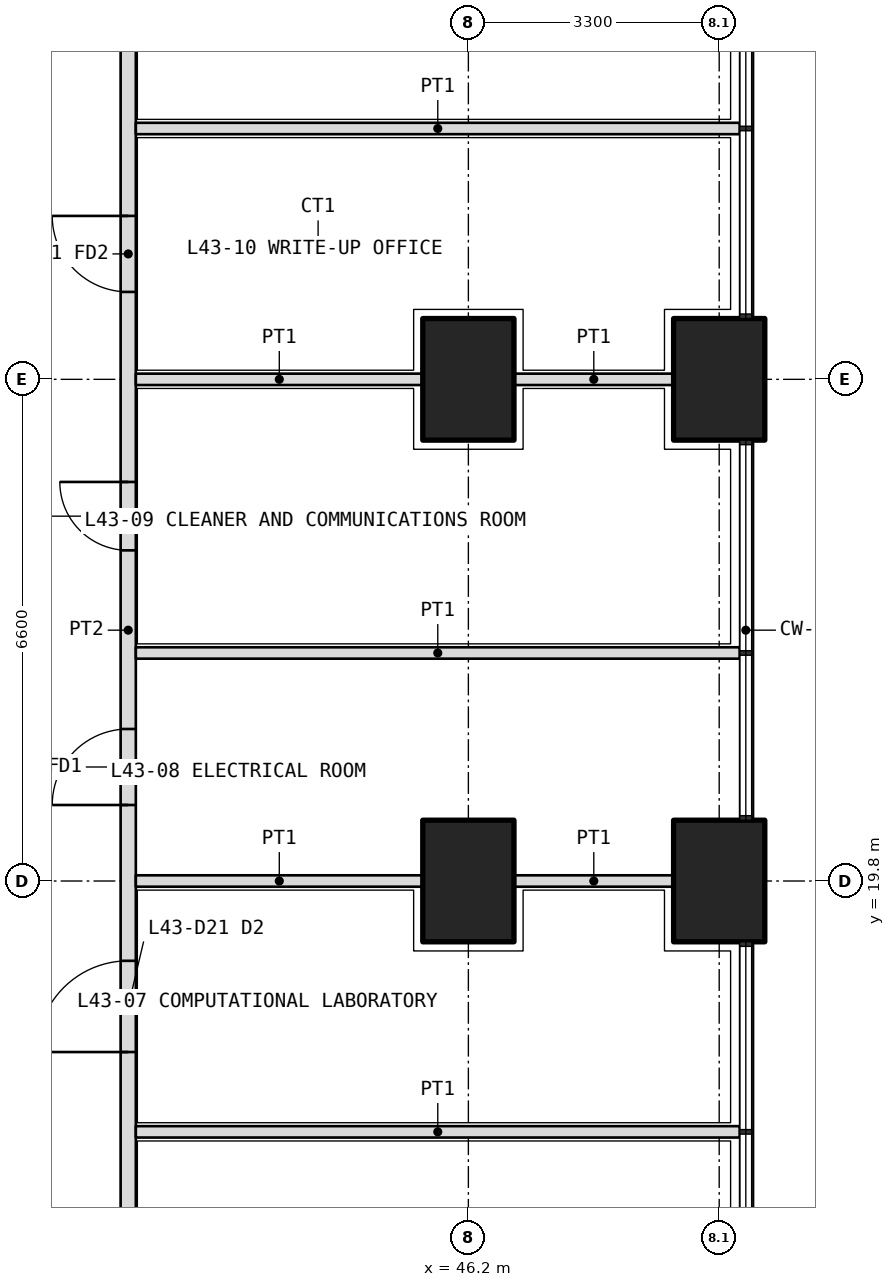
"""IFC4 building model, lengths in metres.
Left out: names, types, materials, properties, quantities, classifications, styles, units other than length and angle.
Written with IfcOpenShell. Run it as: python <this file> out.ifc"""

import sys

from ifc_helpers import new_model, si_unit, direction, frame, frame_2d, origin, origin_2d, place, context, subcontext, project, spatial, rectangle, extrude, element, fill, save


model = new_model("IFC4")
c1 = context("Model", 3, precision=1e-05, world=origin(), true_north=direction((0.0, 1.0)))
c2 = subcontext(c1, "Body", "Model", "MODEL_VIEW")
j1 = project(units=[si_unit("LENGTHUNIT", "METRE"), si_unit("PLANEANGLEUNIT", "RADIAN")], contexts=[c1])
p1 = place(None, origin())
s1 = spatial("IfcSite", under=j1, at=p1, CompositionType="ELEMENT")
p2 = place(p1, origin())
s2 = spatial("IfcBuilding", under=s1, at=p2, CompositionType="ELEMENT")
p3 = place(p2, frame((0.0, 0.0, 189.3)))
s3 = spatial("IfcBuildingStorey", under=s2, at=p3, CompositionType="ELEMENT", Elevation=189.3)
for number, where, z_axis, x_axis in (
    (1, (49.5, 19.8, 0.0), (0.0, 0.0, 1.0), (0.0, 1.0, 0.0)),
    (2, (49.5, 26.4, 0.0), (0.0, 0.0, 1.0), (0.0, 1.0, 0.0)),
    (3, (46.2, 19.8, 0.0), (0.0, 0.0, 1.0), (0.0, 1.0, 0.0)),
    (4, (46.2, 26.4, 0.0), (0.0, 0.0, 1.0), (0.0, 1.0, 0.0)),
):
    element("IfcColumn", number, at=place(p3, frame(where, z_axis=z_axis, x_axis=x_axis)), inside=s3, PredefinedType="COLUMN", context=c2, shape_type="SweptSolid", body=[
        extrude(rectangle(XDim=1.6, YDim=1.2, at=origin_2d()), origin(), (0.0, 0.0, 1.0), 4.2),
    ])
p4 = place(p3, frame((41.725, 11.175, 0.0), z_axis=(0.0, 0.0, 1.0), x_axis=(0.0, 1.0, 0.0)))
e5 = element("IfcWall", 5, at=p4, inside=s3, PredefinedType="PARTITIONING", context=c2, shape_type="SweptSolid", body=[
    extrude(rectangle(XDim=23.85, YDim=0.2, at=frame_2d((11.925, 0.0))), origin(), (0.0, 0.0, 1.0), 2.85),
])
p5 = place(p4, frame((2.012, 0.0, 0.0)))
e6 = element("IfcOpeningElement", 6, at=p5, cuts=e5, PredefinedType="OPENING", context=c2, shape_type="SweptSolid", body=[
    extrude(rectangle(XDim=1.2, YDim=2.1, at=frame_2d((0.6, 1.05))), frame((0.0, 0.11, 0.0), z_axis=(0.0, -1.0, 0.0), x_axis=(1.0, 0.0, 0.0)), (0.0, 0.0, 1.0), 0.22),
])
p6 = place(p4, frame((6.375, 0.0, 0.0)))
e7 = element("IfcOpeningElement", 7, at=p6, cuts=e5, PredefinedType="OPENING", context=c2, shape_type="SweptSolid", body=[
    extrude(rectangle(XDim=1.2, YDim=2.1, at=frame_2d((0.6, 1.05))), frame((0.0, 0.11, 0.0), z_axis=(0.0, -1.0, 0.0), x_axis=(1.0, 0.0, 0.0)), (0.0, 0.0, 1.0), 0.22),
])
p7 = place(p4, frame((9.625, 0.0, 0.0)))
e8 = element("IfcOpeningElement", 8, at=p7, cuts=e5, PredefinedType="OPENING", context=c2, shape_type="SweptSolid", body=[
    extrude(rectangle(XDim=1.0, YDim=2.1, at=frame_2d((0.5, 1.05))), frame((0.0, 0.11, 0.0), z_axis=(0.0, -1.0, 0.0), x_axis=(1.0, 0.0, 0.0)), (0.0, 0.0, 1.0), 0.22),
])
p8 = place(p4, frame((12.975, 0.0, 0.0)))
e9 = element("IfcOpeningElement", 9, at=p8, cuts=e5, PredefinedType="OPENING", context=c2, shape_type="SweptSolid", body=[
    extrude(rectangle(XDim=0.9, YDim=2.1, at=frame_2d((0.45, 1.05))), frame((0.0, 0.11, 0.0), z_axis=(0.0, -1.0, 0.0), x_axis=(1.0, 0.0, 0.0)), (0.0, 0.0, 1.0), 0.22),
])
p9 = place(p4, frame((16.375, 0.0, 0.0)))
e10 = element("IfcOpeningElement", 10, at=p9, cuts=e5, PredefinedType="OPENING", context=c2, shape_type="SweptSolid", body=[
    extrude(rectangle(XDim=1.0, YDim=2.1, at=frame_2d((0.5, 1.05))), frame((0.0, 0.11, 0.0), z_axis=(0.0, -1.0, 0.0), x_axis=(1.0, 0.0, 0.0)), (0.0, 0.0, 1.0), 0.22),
])
p10 = place(p4, frame((20.637, 0.0, 0.0)))
e11 = element("IfcOpeningElement", 11, at=p10, cuts=e5, PredefinedType="OPENING", context=c2, shape_type="SweptSolid", body=[
    extrude(rectangle(XDim=1.2, YDim=2.1, at=frame_2d((0.6, 1.05))), frame((0.0, 0.11, 0.0), z_axis=(0.0, -1.0, 0.0), x_axis=(1.0, 0.0, 0.0)), (0.0, 0.0, 1.0), 0.22),
])
p11 = place(p3, frame((49.77, 22.8, 0.0), z_axis=(0.0, 0.0, 1.0), x_axis=(-1.0, 0.0, 0.0)))
e12 = element("IfcWall", 12, at=p11, inside=s3, PredefinedType="PARTITIONING", context=c2, shape_type="SweptSolid", body=[
    extrude(rectangle(XDim=7.945, YDim=0.15, at=frame_2d((3.973, 0.0))), origin(), (0.0, 0.0, 1.0), 2.7),
])
p12 = place(p3, frame((48.9, 26.4, 0.0), z_axis=(0.0, 0.0, 1.0), x_axis=(-1.0, 0.0, 0.0)))
e13 = element("IfcWall", 13, at=p12, inside=s3, PredefinedType="PARTITIONING", context=c2, shape_type="SweptSolid", body=[
    extrude(rectangle(XDim=2.1, YDim=0.15, at=frame_2d((1.05, 0.0))), origin(), (0.0, 0.0, 1.0), 2.85),
])
p13 = place(p3, frame((45.6, 26.4, 0.0), z_axis=(0.0, 0.0, 1.0), x_axis=(-1.0, 0.0, 0.0)))
e14 = element("IfcWall", 14, at=p13, inside=s3, PredefinedType="PARTITIONING", context=c2, shape_type="SweptSolid", body=[
    extrude(rectangle(XDim=3.775, YDim=0.15, at=frame_2d((1.888, 0.0))), origin(), (0.0, 0.0, 1.0), 2.85),
])
p14 = place(p3, frame((49.77, 16.5, 0.0), z_axis=(0.0, 0.0, 1.0), x_axis=(-1.0, 0.0, 0.0)))
e15 = element("IfcWall", 15, at=p14, inside=s3, PredefinedType="PARTITIONING", context=c2, shape_type="SweptSolid", body=[
    extrude(rectangle(XDim=7.945, YDim=0.15, at=frame_2d((3.973, 0.0))), origin(), (0.0, 0.0, 1.0), 2.7),
])
p15 = place(p3, frame((48.9, 19.8, 0.0), z_axis=(0.0, 0.0, 1.0), x_axis=(-1.0, 0.0, 0.0)))
e16 = element("IfcWall", 16, at=p15, inside=s3, PredefinedType="PARTITIONING", context=c2, shape_type="SweptSolid", body=[
    extrude(rectangle(XDim=2.1, YDim=0.15, at=frame_2d((1.05, 0.0))), origin(), (0.0, 0.0, 1.0), 2.85),
])
p16 = place(p3, frame((45.6, 19.8, 0.0), z_axis=(0.0, 0.0, 1.0), x_axis=(-1.0, 0.0, 0.0)))
e17 = element("IfcWall", 17, at=p16, inside=s3, PredefinedType="PARTITIONING", context=c2, shape_type="SweptSolid", body=[
    extrude(rectangle(XDim=3.775, YDim=0.15, at=frame_2d((1.888, 0.0))), origin(), (0.0, 0.0, 1.0), 2.85),
])
p17 = place(p3, frame((49.77, 29.7, 0.0), z_axis=(0.0, 0.0, 1.0), x_axis=(-1.0, 0.0, 0.0)))
e18 = element("IfcWall", 18, at=p17, inside=s3, PredefinedType="PARTITIONING", context=c2, shape_type="SweptSolid", body=[
    extrude(rectangle(XDim=7.945, YDim=0.15, at=frame_2d((3.973, 0.0))), origin(), (0.0, 0.0, 1.0), 2.7),
])
p18 = place(p6, origin())
e19 = element("IfcDoor", 19, at=p18, inside=s3, OperationType="DOUBLE_DOOR_SINGLE_SWING", PredefinedType="DOOR", context=c2, shape_type="SweptSolid", body=[
    extrude(rectangle(XDim=1.2, YDim=2.1, at=frame_2d((0.6, 1.05))), frame((0.0, 0.025, 0.0), z_axis=(0.0, -1.0, 0.0), x_axis=(1.0, 0.0, 0.0)), (0.0, 0.0, 1.0), 0.05),
])
fill(e7, e19)
p19 = place(p7, origin())
e20 = element("IfcDoor", 20, at=p19, inside=s3, OperationType="SINGLE_SWING_LEFT", PredefinedType="DOOR", context=c2, shape_type="SweptSolid", body=[
    extrude(rectangle(XDim=1.0, YDim=2.1, at=frame_2d((0.5, 1.05))), frame((0.0, 0.025, 0.0), z_axis=(0.0, -1.0, 0.0), x_axis=(1.0, 0.0, 0.0)), (0.0, 0.0, 1.0), 0.05),
])
fill(e8, e20)
p20 = place(p8, origin())
e21 = element("IfcDoor", 21, at=p20, inside=s3, OperationType="SINGLE_SWING_RIGHT", PredefinedType="DOOR", context=c2, shape_type="SweptSolid", body=[
    extrude(rectangle(XDim=0.9, YDim=2.1, at=frame_2d((0.45, 1.05))), frame((0.0, 0.025, 0.0), z_axis=(0.0, -1.0, 0.0), x_axis=(1.0, 0.0, 0.0)), (0.0, 0.0, 1.0), 0.05),
])
fill(e9, e21)
p21 = place(p9, origin())
e22 = element("IfcDoor", 22, at=p21, inside=s3, OperationType="SINGLE_SWING_RIGHT", PredefinedType="DOOR", context=c2, shape_type="SweptSolid", body=[
    extrude(rectangle(XDim=1.0, YDim=2.1, at=frame_2d((0.5, 1.05))), frame((0.0, 0.025, 0.0), z_axis=(0.0, -1.0, 0.0), x_axis=(1.0, 0.0, 0.0)), (0.0, 0.0, 1.0), 0.05),
])
fill(e10, e22)
save(model, sys.argv[1])
